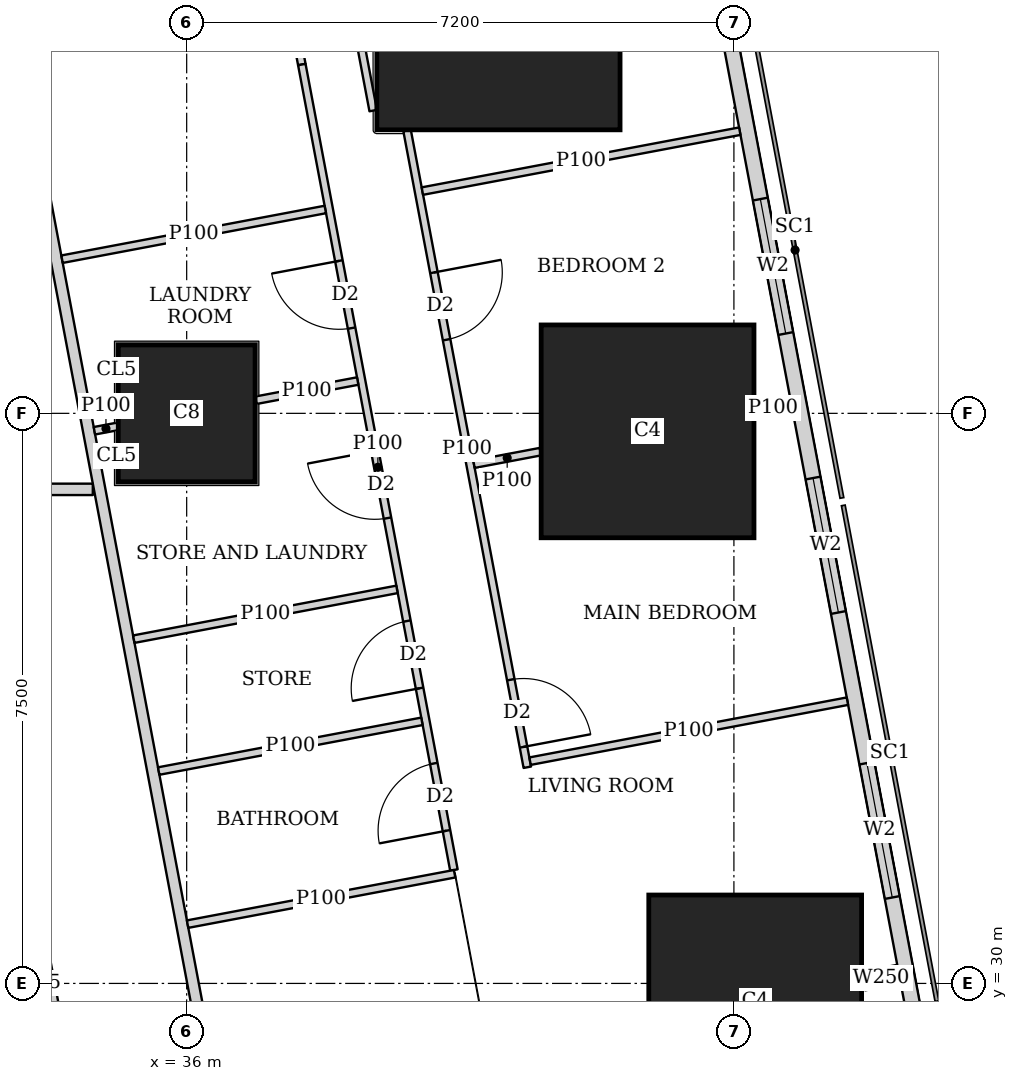
"""IFC4 building model, lengths in metres.
Left out: names, types, materials, properties, quantities, classifications, styles, units other than length and angle.
Written with IfcOpenShell. Run it as: python <this file> out.ifc"""

import sys

from ifc_helpers import new_model, si_unit, direction, frame, frame_2d, origin, origin_2d, place, context, subcontext, project, spatial, rectangle, extrude, element, fill, save


model = new_model("IFC4")
c1 = context("Model", 3, precision=1e-05, world=origin(), true_north=direction((0.0, 1.0)))
c2 = subcontext(c1, "Body", "Model", "MODEL_VIEW")
j1 = project(units=[si_unit("LENGTHUNIT", "METRE"), si_unit("PLANEANGLEUNIT", "RADIAN")], contexts=[c1])
p1 = place(None, origin())
s1 = spatial("IfcSite", under=j1, at=p1, CompositionType="ELEMENT")
p2 = place(p1, origin())
s2 = spatial("IfcBuilding", under=s1, at=p2, CompositionType="ELEMENT")
p3 = place(p2, frame((0.0, 0.0, 65.0)))
s3 = spatial("IfcBuildingStorey", under=s2, at=p3, CompositionType="ELEMENT", Elevation=65.0)
p4 = place(p3, frame((43.48, 29.763, 0.0), z_axis=(0.0, 0.0, 1.0), x_axis=(1.0, 0.0, 0.0)))
e1 = element("IfcColumn", 1, at=p4, inside=s3, PredefinedType="COLUMN", context=c2, shape_type="SweptSolid", body=[
    extrude(rectangle(XDim=2.8, YDim=2.8, at=origin_2d()), origin(), (0.0, 0.0, 1.0), 3.75),
])
p5 = place(p3, frame((36.0, 37.5, 0.0), z_axis=(0.0, 0.0, 1.0), x_axis=(1.0, 0.0, 0.0)))
e2 = element("IfcColumn", 2, at=p5, inside=s3, PredefinedType="COLUMN", context=c2, shape_type="SweptSolid", body=[
    extrude(rectangle(XDim=1.8, YDim=1.8, at=origin_2d()), origin(), (0.0, 0.0, 1.0), 3.75),
])
p6 = place(p3, frame((42.064, 37.263, 0.0), z_axis=(0.0, 0.0, 1.0), x_axis=(1.0, 0.0, 0.0)))
e3 = element("IfcColumn", 3, at=p6, inside=s3, PredefinedType="COLUMN", context=c2, shape_type="SweptSolid", body=[
    extrude(rectangle(XDim=2.8, YDim=2.8, at=origin_2d()), origin(), (0.0, 0.0, 1.0), 3.75),
])
p7 = place(p3, frame((40.102, 42.83, 0.0), z_axis=(0.0, 0.0, 1.0), x_axis=(1.0, 0.0, 0.0)))
e4 = element("IfcColumn", 4, at=p7, inside=s3, PredefinedType="COLUMN", context=c2, shape_type="SweptSolid", body=[
    extrude(rectangle(XDim=3.2, YDim=3.2, at=origin_2d()), origin(), (0.0, 0.0, 1.0), 3.75),
])
p8 = place(p3, frame((50.653, 2.703, 0.0), z_axis=(0.0, 0.0, 1.0), x_axis=(-0.185612026696, 0.982623109613, 0.0)))
e5 = element("IfcWall", 5, at=p8, inside=s3, PredefinedType="SOLIDWALL", context=c2, shape_type="SweptSolid", body=[
    extrude(rectangle(XDim=41.393, YDim=0.2, at=frame_2d((20.697, 0.0))), origin(), (0.0, 0.0, 1.0), 3.5),
])
p9 = place(p8, frame((1.633, 0.0, 0.9)))
e6 = element("IfcOpeningElement", 6, at=p9, cuts=e5, PredefinedType="OPENING", context=c2, shape_type="SweptSolid", body=[
    extrude(rectangle(XDim=1.8, YDim=1.5, at=frame_2d((0.9, 0.75))), frame((0.0, 0.11, 0.0), z_axis=(0.0, -1.0, 0.0), x_axis=(1.0, 0.0, 0.0)), (0.0, 0.0, 1.0), 0.22),
])
p10 = place(p8, frame((6.032, 0.0, 0.9)))
e7 = element("IfcOpeningElement", 7, at=p10, cuts=e5, PredefinedType="OPENING", context=c2, shape_type="SweptSolid", body=[
    extrude(rectangle(XDim=1.8, YDim=1.5, at=frame_2d((0.9, 0.75))), frame((0.0, 0.11, 0.0), z_axis=(0.0, -1.0, 0.0), x_axis=(1.0, 0.0, 0.0)), (0.0, 0.0, 1.0), 0.22),
])
p11 = place(p8, frame((9.848, 0.0, 0.9)))
e8 = element("IfcOpeningElement", 8, at=p11, cuts=e5, PredefinedType="OPENING", context=c2, shape_type="SweptSolid", body=[
    extrude(rectangle(XDim=1.8, YDim=1.5, at=frame_2d((0.9, 0.75))), frame((0.0, 0.11, 0.0), z_axis=(0.0, -1.0, 0.0), x_axis=(1.0, 0.0, 0.0)), (0.0, 0.0, 1.0), 0.22),
])
p12 = place(p8, frame((17.481, 0.0, 0.9)))
e9 = element("IfcOpeningElement", 9, at=p12, cuts=e5, PredefinedType="OPENING", context=c2, shape_type="SweptSolid", body=[
    extrude(rectangle(XDim=1.8, YDim=1.5, at=frame_2d((0.9, 0.75))), frame((0.0, 0.11, 0.0), z_axis=(0.0, -1.0, 0.0), x_axis=(1.0, 0.0, 0.0)), (0.0, 0.0, 1.0), 0.22),
])
p13 = place(p8, frame((21.297, 0.0, 0.9)))
e10 = element("IfcOpeningElement", 10, at=p13, cuts=e5, PredefinedType="OPENING", context=c2, shape_type="SweptSolid", body=[
    extrude(rectangle(XDim=1.8, YDim=1.5, at=frame_2d((0.9, 0.75))), frame((0.0, 0.11, 0.0), z_axis=(0.0, -1.0, 0.0), x_axis=(1.0, 0.0, 0.0)), (0.0, 0.0, 1.0), 0.22),
])
p14 = place(p8, frame((25.113, 0.0, 0.9)))
e11 = element("IfcOpeningElement", 11, at=p14, cuts=e5, PredefinedType="OPENING", context=c2, shape_type="SweptSolid", body=[
    extrude(rectangle(XDim=1.8, YDim=1.5, at=frame_2d((0.9, 0.75))), frame((0.0, 0.11, 0.0), z_axis=(0.0, -1.0, 0.0), x_axis=(1.0, 0.0, 0.0)), (0.0, 0.0, 1.0), 0.22),
])
p15 = place(p8, frame((28.93, 0.0, 0.9)))
e12 = element("IfcOpeningElement", 12, at=p15, cuts=e5, PredefinedType="OPENING", context=c2, shape_type="SweptSolid", body=[
    extrude(rectangle(XDim=1.8, YDim=1.5, at=frame_2d((0.9, 0.75))), frame((0.0, 0.11, 0.0), z_axis=(0.0, -1.0, 0.0), x_axis=(1.0, 0.0, 0.0)), (0.0, 0.0, 1.0), 0.22),
])
p16 = place(p8, frame((32.746, 0.0, 0.9)))
e13 = element("IfcOpeningElement", 13, at=p16, cuts=e5, PredefinedType="OPENING", context=c2, shape_type="SweptSolid", body=[
    extrude(rectangle(XDim=1.8, YDim=1.5, at=frame_2d((0.9, 0.75))), frame((0.0, 0.11, 0.0), z_axis=(0.0, -1.0, 0.0), x_axis=(1.0, 0.0, 0.0)), (0.0, 0.0, 1.0), 0.22),
])
p17 = place(p8, frame((36.481, 0.0, 0.9)))
e14 = element("IfcOpeningElement", 14, at=p17, cuts=e5, PredefinedType="OPENING", context=c2, shape_type="SweptSolid", body=[
    extrude(rectangle(XDim=1.8, YDim=1.5, at=frame_2d((0.9, 0.75))), frame((0.0, 0.11, 0.0), z_axis=(0.0, -1.0, 0.0), x_axis=(1.0, 0.0, 0.0)), (0.0, 0.0, 1.0), 0.22),
])
p18 = place(p3, frame((8.35, 36.5, 0.0), z_axis=(0.0, 0.0, 1.0), x_axis=(1.0, 0.0, 0.0)))
e15 = element("IfcWall", 15, at=p18, inside=s3, PredefinedType="SOLIDWALL", context=c2, shape_type="SweptSolid", body=[
    extrude(rectangle(XDim=26.415, YDim=0.15, at=frame_2d((13.208, 0.0))), origin(), (0.0, 0.0, 1.0), 3.5),
])
p19 = place(p18, frame((2.6, 0.0, 0.0)))
e16 = element("IfcOpeningElement", 16, at=p19, cuts=e15, PredefinedType="OPENING", context=c2, shape_type="SweptSolid", body=[
    extrude(rectangle(XDim=1.0, YDim=2.1, at=frame_2d((0.5, 1.05))), frame((0.0, 0.085, 0.0), z_axis=(0.0, -1.0, 0.0), x_axis=(1.0, 0.0, 0.0)), (0.0, 0.0, 1.0), 0.17),
])
p20 = place(p18, frame((10.949, 0.0, 0.0)))
e17 = element("IfcOpeningElement", 17, at=p20, cuts=e15, PredefinedType="OPENING", context=c2, shape_type="SweptSolid", body=[
    extrude(rectangle(XDim=1.0, YDim=2.1, at=frame_2d((0.5, 1.05))), frame((0.0, 0.085, 0.0), z_axis=(0.0, -1.0, 0.0), x_axis=(1.0, 0.0, 0.0)), (0.0, 0.0, 1.0), 0.17),
])
p21 = place(p18, frame((18.149, 0.0, 0.0)))
e18 = element("IfcOpeningElement", 18, at=p21, cuts=e15, PredefinedType="OPENING", context=c2, shape_type="SweptSolid", body=[
    extrude(rectangle(XDim=1.0, YDim=2.1, at=frame_2d((0.5, 1.05))), frame((0.0, 0.085, 0.0), z_axis=(0.0, -1.0, 0.0), x_axis=(1.0, 0.0, 0.0)), (0.0, 0.0, 1.0), 0.17),
])
p22 = place(p3, frame((33.68, 42.723, 0.0), z_axis=(0.0, 0.0, 1.0), x_axis=(0.185624129307, -0.98262082342, 0.0)))
e19 = element("IfcWall", 19, at=p22, inside=s3, PredefinedType="SOLIDWALL", context=c2, shape_type="SweptSolid", body=[
    extrude(rectangle(XDim=41.051, YDim=0.15, at=frame_2d((20.526, 0.0))), origin(), (0.0, 0.0, 1.0), 2.5),
])
p23 = place(p22, frame((13.577, 0.0, 0.0)))
e20 = element("IfcOpeningElement", 20, at=p23, cuts=e19, PredefinedType="OPENING", context=c2, shape_type="SweptSolid", body=[
    extrude(rectangle(XDim=1.0, YDim=2.1, at=frame_2d((0.5, 1.05))), frame((0.0, 0.085, 0.0), z_axis=(0.0, -1.0, 0.0), x_axis=(1.0, 0.0, 0.0)), (0.0, 0.0, 1.0), 0.17),
])
p24 = place(p22, frame((17.394, 0.0, 0.0)))
e21 = element("IfcOpeningElement", 21, at=p24, cuts=e19, PredefinedType="OPENING", context=c2, shape_type="SweptSolid", body=[
    extrude(rectangle(XDim=1.0, YDim=2.1, at=frame_2d((0.5, 1.05))), frame((0.0, 0.085, 0.0), z_axis=(0.0, -1.0, 0.0), x_axis=(1.0, 0.0, 0.0)), (0.0, 0.0, 1.0), 0.17),
])
p25 = place(p22, frame((26.758, 0.0, 0.0)))
e22 = element("IfcOpeningElement", 22, at=p25, cuts=e19, PredefinedType="OPENING", context=c2, shape_type="SweptSolid", body=[
    extrude(rectangle(XDim=1.0, YDim=2.1, at=frame_2d((0.5, 1.05))), frame((0.0, 0.085, 0.0), z_axis=(0.0, -1.0, 0.0), x_axis=(1.0, 0.0, 0.0)), (0.0, 0.0, 1.0), 0.17),
])
p26 = place(p22, frame((32.193, 0.0, 0.0)))
e23 = element("IfcOpeningElement", 23, at=p26, cuts=e19, PredefinedType="OPENING", context=c2, shape_type="SweptSolid", body=[
    extrude(rectangle(XDim=1.0, YDim=2.1, at=frame_2d((0.5, 1.05))), frame((0.0, 0.085, 0.0), z_axis=(0.0, -1.0, 0.0), x_axis=(1.0, 0.0, 0.0)), (0.0, 0.0, 1.0), 0.17),
])
p27 = place(p3, frame((38.454, 41.483, 0.0), z_axis=(0.0, 0.0, 1.0), x_axis=(-0.185609245326, 0.982623634994, 0.0)))
e24 = element("IfcWall", 24, at=p27, inside=s3, PredefinedType="PARTITIONING", context=c2, shape_type="SweptSolid", body=[
    extrude(rectangle(XDim=4.241, YDim=0.1, at=frame_2d((2.12, 0.0))), origin(), (0.0, 0.0, 1.0), 2.05),
])
p28 = place(p3, frame((38.9, 41.22, 0.0), z_axis=(0.0, 0.0, 1.0), x_axis=(0.185595712897, -0.982626191059, 0.0)))
e25 = element("IfcWall", 25, at=p28, inside=s3, PredefinedType="PARTITIONING", context=c2, shape_type="SweptSolid", body=[
    extrude(rectangle(XDim=8.524, YDim=0.1, at=frame_2d((4.262, 0.0))), origin(), (0.0, 0.0, 1.0), 3.5),
])
p29 = place(p28, frame((7.352, 0.0, 0.0)))
e26 = element("IfcOpeningElement", 26, at=p29, cuts=e25, PredefinedType="OPENING", context=c2, shape_type="SweptSolid", body=[
    extrude(rectangle(XDim=0.9, YDim=2.1, at=frame_2d((0.45, 1.05))), frame((0.0, 0.06, 0.0), z_axis=(0.0, -1.0, 0.0), x_axis=(1.0, 0.0, 0.0)), (0.0, 0.0, 1.0), 0.12),
])
p30 = place(p28, frame((1.9, 0.0, 0.0)))
e27 = element("IfcOpeningElement", 27, at=p30, cuts=e25, PredefinedType="OPENING", context=c2, shape_type="SweptSolid", body=[
    extrude(rectangle(XDim=0.9, YDim=2.1, at=frame_2d((0.45, 1.05))), frame((0.0, 0.06, 0.0), z_axis=(0.0, -1.0, 0.0), x_axis=(1.0, 0.0, 0.0)), (0.0, 0.0, 1.0), 0.12),
])
p31 = place(p3, frame((37.418, 42.602, 0.0), z_axis=(0.0, 0.0, 1.0), x_axis=(0.185672001976, -0.982611778721, 0.0)))
e28 = element("IfcWall", 28, at=p31, inside=s3, PredefinedType="PARTITIONING", context=c2, shape_type="SweptSolid", body=[
    extrude(rectangle(XDim=0.522, YDim=0.1, at=frame_2d((0.261, 0.0))), origin(), (0.0, 0.0, 1.0), 2.05),
])
p32 = place(p3, frame((37.515, 42.089, 0.0), z_axis=(0.0, 0.0, 1.0), x_axis=(0.185565000991, -0.982631991341, 0.0)))
e29 = element("IfcWall", 29, at=p32, inside=s3, PredefinedType="PARTITIONING", context=c2, shape_type="SweptSolid", body=[
    extrude(rectangle(XDim=10.784, YDim=0.1, at=frame_2d((5.392, 0.0))), origin(), (0.0, 0.0, 1.0), 3.5),
])
p33 = place(p32, frame((9.358, 0.0, 0.0)))
e30 = element("IfcOpeningElement", 30, at=p33, cuts=e29, PredefinedType="OPENING", context=c2, shape_type="SweptSolid", body=[
    extrude(rectangle(XDim=0.9, YDim=2.1, at=frame_2d((0.45, 1.05))), frame((0.0, 0.06, 0.0), z_axis=(0.0, -1.0, 0.0), x_axis=(1.0, 0.0, 0.0)), (0.0, 0.0, 1.0), 0.12),
])
p34 = place(p32, frame((5.173, 0.0, 0.0)))
e31 = element("IfcOpeningElement", 31, at=p34, cuts=e29, PredefinedType="OPENING", context=c2, shape_type="SweptSolid", body=[
    extrude(rectangle(XDim=0.9, YDim=2.1, at=frame_2d((0.45, 1.05))), frame((0.0, 0.06, 0.0), z_axis=(0.0, -1.0, 0.0), x_axis=(1.0, 0.0, 0.0)), (0.0, 0.0, 1.0), 0.12),
])
p35 = place(p32, frame((2.629, 0.0, 0.0)))
e32 = element("IfcOpeningElement", 32, at=p35, cuts=e29, PredefinedType="OPENING", context=c2, shape_type="SweptSolid", body=[
    extrude(rectangle(XDim=0.9, YDim=2.1, at=frame_2d((0.45, 1.05))), frame((0.0, 0.06, 0.0), z_axis=(0.0, -1.0, 0.0), x_axis=(1.0, 0.0, 0.0)), (0.0, 0.0, 1.0), 0.12),
])
p36 = place(p32, frame((7.451, 0.0, 0.0)))
e33 = element("IfcOpeningElement", 33, at=p36, cuts=e29, PredefinedType="OPENING", context=c2, shape_type="SweptSolid", body=[
    extrude(rectangle(XDim=0.9, YDim=2.1, at=frame_2d((0.45, 1.05))), frame((0.0, 0.06, 0.0), z_axis=(0.0, -1.0, 0.0), x_axis=(1.0, 0.0, 0.0)), (0.0, 0.0, 1.0), 0.12),
])
p37 = place(p3, frame((43.277, 41.212, 0.0), z_axis=(0.0, 0.0, 1.0), x_axis=(-0.982665405803, -0.185387972203, 0.0)))
e34 = element("IfcWall", 34, at=p37, inside=s3, PredefinedType="PARTITIONING", context=c2, shape_type="SweptSolid", body=[
    extrude(rectangle(XDim=4.25, YDim=0.1, at=frame_2d((2.125, 0.0))), origin(), (0.0, 0.0, 1.0), 2.05),
])
p38 = place(p3, frame((43.955, 37.62, 0.0), z_axis=(0.0, 0.0, 1.0), x_axis=(-0.982543152073, -0.186034820164, 0.0)))
e35 = element("IfcWall", 35, at=p38, inside=s3, PredefinedType="PARTITIONING", context=c2, shape_type="SweptSolid", body=[
    extrude(rectangle(XDim=0.49, YDim=0.1, at=frame_2d((0.245, 0.0))), origin(), (0.0, 0.0, 1.0), 3.5),
])
p39 = place(p3, frame((40.654, 36.996, 0.0), z_axis=(0.0, 0.0, 1.0), x_axis=(-0.982635224332, -0.185547880349, 0.0)))
e36 = element("IfcWall", 36, at=p39, inside=s3, PredefinedType="PARTITIONING", context=c2, shape_type="SweptSolid", body=[
    extrude(rectangle(XDim=0.889, YDim=0.1, at=frame_2d((0.445, 0.0))), origin(), (0.0, 0.0, 1.0), 3.5),
])
p40 = place(p3, frame((44.693, 33.713, 0.0), z_axis=(0.0, 0.0, 1.0), x_axis=(-0.982615600536, -0.185651775062, 0.0)))
e37 = element("IfcWall", 37, at=p40, inside=s3, PredefinedType="PARTITIONING", context=c2, shape_type="SweptSolid", body=[
    extrude(rectangle(XDim=4.249, YDim=0.1, at=frame_2d((2.125, 0.0))), origin(), (0.0, 0.0, 1.0), 2.05),
])
p41 = place(p3, frame((37.824, 40.182, 0.0), z_axis=(0.0, 0.0, 1.0), x_axis=(-0.982648794755, -0.185475998897, 0.0)))
e38 = element("IfcWall", 38, at=p41, inside=s3, PredefinedType="PARTITIONING", context=c2, shape_type="SweptSolid", body=[
    extrude(rectangle(XDim=3.525, YDim=0.1, at=frame_2d((1.763, 0.0))), origin(), (0.0, 0.0, 1.0), 3.5),
])
p42 = place(p3, frame((38.25, 37.925, 0.0), z_axis=(0.0, 0.0, 1.0), x_axis=(-0.982650574676, -0.185466568658, 0.0)))
e39 = element("IfcWall", 39, at=p42, inside=s3, PredefinedType="PARTITIONING", context=c2, shape_type="SweptSolid", body=[
    extrude(rectangle(XDim=1.364, YDim=0.1, at=frame_2d((0.682, 0.0))), origin(), (0.0, 0.0, 1.0), 3.5),
])
p43 = place(p3, frame((35.09, 37.328, 0.0), z_axis=(0.0, 0.0, 1.0), x_axis=(-0.982961380226, -0.183812200315, 0.0)))
e40 = element("IfcWall", 40, at=p43, inside=s3, PredefinedType="PARTITIONING", context=c2, shape_type="SweptSolid", body=[
    extrude(rectangle(XDim=0.31, YDim=0.1, at=frame_2d((0.155, 0.0))), origin(), (0.0, 0.0, 1.0), 3.5),
])
p44 = place(p3, frame((39.525, 31.443, 0.0), z_axis=(0.0, 0.0, 1.0), x_axis=(-0.982648035033, -0.185480023848, 0.0)))
e41 = element("IfcWall", 41, at=p44, inside=s3, PredefinedType="PARTITIONING", context=c2, shape_type="SweptSolid", body=[
    extrude(rectangle(XDim=3.575, YDim=0.1, at=frame_2d((1.788, 0.0))), origin(), (0.0, 0.0, 1.0), 3.5),
])
p45 = place(p3, frame((38.767, 35.184, 0.0), z_axis=(0.0, 0.0, 1.0), x_axis=(-0.982578451485, -0.185848289414, 0.0)))
e42 = element("IfcWall", 42, at=p45, inside=s3, PredefinedType="PARTITIONING", context=c2, shape_type="SweptSolid", body=[
    extrude(rectangle(XDim=3.525, YDim=0.1, at=frame_2d((1.762, 0.0))), origin(), (0.0, 0.0, 1.0), 3.5),
])
p46 = place(p3, frame((39.095, 33.448, 0.0), z_axis=(0.0, 0.0, 1.0), x_axis=(-0.982626628545, -0.185593396635, 0.0)))
e43 = element("IfcWall", 43, at=p46, inside=s3, PredefinedType="PARTITIONING", context=c2, shape_type="SweptSolid", body=[
    extrude(rectangle(XDim=3.524, YDim=0.1, at=frame_2d((1.762, 0.0))), origin(), (0.0, 0.0, 1.0), 3.5),
])
p47 = place(p3, frame((45.372, 30.121, 0.0), z_axis=(0.0, 0.0, 1.0), x_axis=(-0.982352019699, -0.187041464366, 0.0)))
e44 = element("IfcWall", 44, at=p47, inside=s3, PredefinedType="SOLIDWALL", context=c2, shape_type="SweptSolid", body=[
    extrude(rectangle(XDim=0.476, YDim=0.25, at=frame_2d((0.238, 0.0))), origin(), (0.0, 0.0, 1.0), 3.5),
])
p48 = place(p3, frame((36.861, 15.913, 0.0), z_axis=(0.0, 0.0, 1.0), x_axis=(-0.185588307143, 0.982627589808, 0.0)))
e45 = element("IfcWall", 45, at=p48, inside=s3, PredefinedType="PARTITIONING", context=c2, shape_type="SweptSolid", body=[
    extrude(rectangle(XDim=19.005, YDim=0.125, at=frame_2d((9.502, 0.0))), origin(), (0.0, 0.0, 1.0), 2.5),
])
p49 = place(p48, frame((7.527, 0.0, 0.0)))
e46 = element("IfcOpeningElement", 46, at=p49, cuts=e45, PredefinedType="OPENING", context=c2, shape_type="SweptSolid", body=[
    extrude(rectangle(XDim=1.0, YDim=2.1, at=frame_2d((0.5, 1.05))), frame((0.0, 0.073, 0.0), z_axis=(0.0, -1.0, 0.0), x_axis=(1.0, 0.0, 0.0)), (0.0, 0.0, 1.0), 0.145),
])
p50 = place(p48, frame((15.5, 0.0, 0.0)))
e47 = element("IfcOpeningElement", 47, at=p50, cuts=e45, PredefinedType="OPENING", context=c2, shape_type="SweptSolid", body=[
    extrude(rectangle(XDim=1.0, YDim=2.1, at=frame_2d((0.5, 1.05))), frame((0.0, 0.073, 0.0), z_axis=(0.0, -1.0, 0.0), x_axis=(1.0, 0.0, 0.0)), (0.0, 0.0, 1.0), 0.145),
])
p51 = place(p48, frame((17.602, 0.0, 0.0)))
e48 = element("IfcOpeningElement", 48, at=p51, cuts=e45, PredefinedType="OPENING", context=c2, shape_type="SweptSolid", body=[
    extrude(rectangle(XDim=1.0, YDim=2.1, at=frame_2d((0.5, 1.05))), frame((0.0, 0.073, 0.0), z_axis=(0.0, -1.0, 0.0), x_axis=(1.0, 0.0, 0.0)), (0.0, 0.0, 1.0), 0.145),
])
p52 = place(p15, origin())
e49 = element("IfcWindow", 49, at=p52, inside=s3, PartitioningType="SINGLE_PANEL", PredefinedType="WINDOW", context=c2, shape_type="SweptSolid", body=[
    extrude(rectangle(XDim=1.8, YDim=1.5, at=frame_2d((0.9, 0.75))), frame((0.0, 0.03, 0.0), z_axis=(0.0, -1.0, 0.0), x_axis=(1.0, 0.0, 0.0)), (0.0, 0.0, 1.0), 0.06),
])
fill(e12, e49)
p53 = place(p16, origin())
e50 = element("IfcWindow", 50, at=p53, inside=s3, PartitioningType="SINGLE_PANEL", PredefinedType="WINDOW", context=c2, shape_type="SweptSolid", body=[
    extrude(rectangle(XDim=1.8, YDim=1.5, at=frame_2d((0.9, 0.75))), frame((0.0, 0.03, 0.0), z_axis=(0.0, -1.0, 0.0), x_axis=(1.0, 0.0, 0.0)), (0.0, 0.0, 1.0), 0.06),
])
fill(e13, e50)
p54 = place(p17, origin())
e51 = element("IfcWindow", 51, at=p54, inside=s3, PartitioningType="SINGLE_PANEL", PredefinedType="WINDOW", context=c2, shape_type="SweptSolid", body=[
    extrude(rectangle(XDim=1.8, YDim=1.5, at=frame_2d((0.9, 0.75))), frame((0.0, 0.03, 0.0), z_axis=(0.0, -1.0, 0.0), x_axis=(1.0, 0.0, 0.0)), (0.0, 0.0, 1.0), 0.06),
])
fill(e14, e51)
p55 = place(p29, origin())
e52 = element("IfcDoor", 52, at=p55, inside=s3, OperationType="SINGLE_SWING_RIGHT", PredefinedType="DOOR", context=c2, shape_type="SweptSolid", body=[
    extrude(rectangle(XDim=0.9, YDim=2.1, at=frame_2d((0.45, 1.05))), frame((0.0, 0.025, 0.0), z_axis=(0.0, -1.0, 0.0), x_axis=(1.0, 0.0, 0.0)), (0.0, 0.0, 1.0), 0.05),
])
fill(e26, e52)
p56 = place(p30, origin())
e53 = element("IfcDoor", 53, at=p56, inside=s3, OperationType="SINGLE_SWING_LEFT", PredefinedType="DOOR", context=c2, shape_type="SweptSolid", body=[
    extrude(rectangle(XDim=0.9, YDim=2.1, at=frame_2d((0.45, 1.05))), frame((0.0, 0.025, 0.0), z_axis=(0.0, -1.0, 0.0), x_axis=(1.0, 0.0, 0.0)), (0.0, 0.0, 1.0), 0.05),
])
fill(e27, e53)
p57 = place(p33, origin())
e54 = element("IfcDoor", 54, at=p57, inside=s3, OperationType="SINGLE_SWING_LEFT", PredefinedType="DOOR", context=c2, shape_type="SweptSolid", body=[
    extrude(rectangle(XDim=0.9, YDim=2.1, at=frame_2d((0.45, 1.05))), frame((0.0, 0.025, 0.0), z_axis=(0.0, -1.0, 0.0), x_axis=(1.0, 0.0, 0.0)), (0.0, 0.0, 1.0), 0.05),
])
fill(e30, e54)
p58 = place(p34, origin())
e55 = element("IfcDoor", 55, at=p58, inside=s3, OperationType="SINGLE_SWING_RIGHT", PredefinedType="DOOR", context=c2, shape_type="SweptSolid", body=[
    extrude(rectangle(XDim=0.9, YDim=2.1, at=frame_2d((0.45, 1.05))), frame((0.0, 0.025, 0.0), z_axis=(0.0, -1.0, 0.0), x_axis=(1.0, 0.0, 0.0)), (0.0, 0.0, 1.0), 0.05),
])
fill(e31, e55)
p59 = place(p35, origin())
e56 = element("IfcDoor", 56, at=p59, inside=s3, OperationType="SINGLE_SWING_RIGHT", PredefinedType="DOOR", context=c2, shape_type="SweptSolid", body=[
    extrude(rectangle(XDim=0.9, YDim=2.1, at=frame_2d((0.45, 1.05))), frame((0.0, 0.025, 0.0), z_axis=(0.0, -1.0, 0.0), x_axis=(1.0, 0.0, 0.0)), (0.0, 0.0, 1.0), 0.05),
])
fill(e32, e56)
p60 = place(p36, origin())
e57 = element("IfcDoor", 57, at=p60, inside=s3, OperationType="SINGLE_SWING_LEFT", PredefinedType="DOOR", context=c2, shape_type="SweptSolid", body=[
    extrude(rectangle(XDim=0.9, YDim=2.1, at=frame_2d((0.45, 1.05))), frame((0.0, 0.025, 0.0), z_axis=(0.0, -1.0, 0.0), x_axis=(1.0, 0.0, 0.0)), (0.0, 0.0, 1.0), 0.05),
])
fill(e33, e57)
save(model, sys.argv[1])
